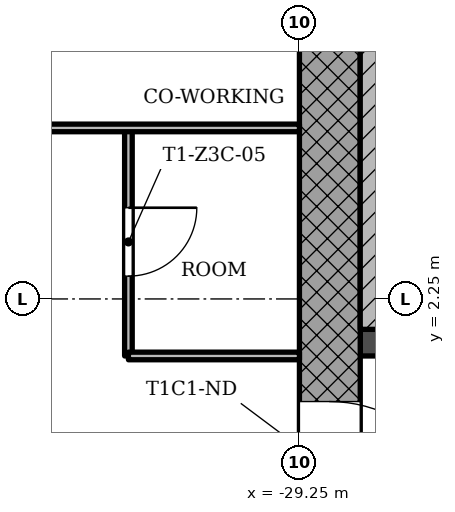
"""IFC4 building model, lengths in metres.
Left out: names, types, materials, properties, quantities, classifications, styles, units other than length and angle.
Written with IfcOpenShell. Run it as: python <this file> out.ifc"""

import sys

from ifc_helpers import new_model, si_unit, direction, frame, frame_2d, origin, place, context, subcontext, project, spatial, rectangle, extrude, element, fill, save


model = new_model("IFC4")
c1 = context("Model", 3, precision=1e-05, world=origin(), true_north=direction((0.0, 1.0)))
c2 = subcontext(c1, "Body", "Model", "MODEL_VIEW")
j1 = project(units=[si_unit("LENGTHUNIT", "METRE"), si_unit("PLANEANGLEUNIT", "RADIAN")], contexts=[c1])
p1 = place(None, origin())
s1 = spatial("IfcSite", under=j1, at=p1, CompositionType="ELEMENT")
p2 = place(p1, origin())
s2 = spatial("IfcBuilding", under=s1, at=p2, CompositionType="ELEMENT")
p3 = place(p2, frame((0.0, 0.0, 160.9)))
s3 = spatial("IfcBuildingStorey", under=s2, at=p3, CompositionType="ELEMENT", Elevation=160.9)
p4 = place(p3, frame((-28.85, 5.95, 0.0), z_axis=(0.0, 0.0, 1.0), x_axis=(0.0, -1.0, 0.0)))
e1 = element("IfcWall", 1, at=p4, inside=s3, PredefinedType="SHEAR", context=c2, shape_type="SweptSolid", body=[
    extrude(rectangle(XDim=12.7, YDim=0.8, at=frame_2d((6.35, 0.0))), origin(), (0.0, 0.0, 1.0), 3.4),
])
p5 = place(p4, frame((5.05, 0.0, 0.0)))
e2 = element("IfcOpeningElement", 2, at=p5, cuts=e1, PredefinedType="OPENING", context=c2, shape_type="SweptSolid", body=[
    extrude(rectangle(XDim=1.8, YDim=2.1, at=frame_2d((0.9, 1.05))), frame((0.0, 0.41, 0.0), z_axis=(0.0, -1.0, 0.0), x_axis=(1.0, 0.0, 0.0)), (0.0, 0.0, 1.0), 0.82),
])
p6 = place(p3, frame((-28.45, 1.675, 0.0), z_axis=(0.0, 0.0, 1.0), x_axis=(1.0, 0.0, 0.0)))
e3 = element("IfcWall", 3, at=p6, inside=s3, PredefinedType="SHEAR", context=c2, shape_type="SweptSolid", body=[
    extrude(rectangle(XDim=7.4, YDim=0.35, at=frame_2d((3.7, 0.0))), origin(), (0.0, 0.0, 1.0), 3.4),
])
p7 = place(p6, frame((0.85, 0.0, 0.0)))
e4 = element("IfcOpeningElement", 4, at=p7, cuts=e3, PredefinedType="OPENING", context=c2, shape_type="SweptSolid", body=[
    extrude(rectangle(XDim=0.9, YDim=2.1, at=frame_2d((0.45, 1.05))), frame((0.0, 0.185, 0.0), z_axis=(0.0, -1.0, 0.0), x_axis=(1.0, 0.0, 0.0)), (0.0, 0.0, 1.0), 0.37),
])
p8 = place(p3, frame((-31.5, 1.5, 0.0), z_axis=(0.0, 0.0, 1.0), x_axis=(0.0, 1.0, 0.0)))
e5 = element("IfcWall", 5, at=p8, inside=s3, PredefinedType="PARTITIONING", context=c2, shape_type="SweptSolid", body=[
    extrude(rectangle(XDim=3.0, YDim=0.1, at=frame_2d((1.5, 0.0))), origin(), (0.0, 0.0, 1.0), 3.0),
])
p9 = place(p8, frame((1.05, 0.0, 0.0)))
e6 = element("IfcOpeningElement", 6, at=p9, cuts=e5, PredefinedType="OPENING", context=c2, shape_type="SweptSolid", body=[
    extrude(rectangle(XDim=0.9, YDim=2.1, at=frame_2d((0.45, 1.05))), frame((0.0, 0.06, 0.0), z_axis=(0.0, -1.0, 0.0), x_axis=(1.0, 0.0, 0.0)), (0.0, 0.0, 1.0), 0.12),
])
p10 = place(p3, frame((-31.5, 1.5, 0.0), z_axis=(0.0, 0.0, 1.0), x_axis=(1.0, 0.0, 0.0)))
e7 = element("IfcWall", 7, at=p10, inside=s3, PredefinedType="PARTITIONING", context=c2, shape_type="SweptSolid", body=[
    extrude(rectangle(XDim=2.25, YDim=0.1, at=frame_2d((1.125, 0.0))), origin(), (0.0, 0.0, 1.0), 3.0),
])
p11 = place(p3, frame((-35.1, 4.5, 0.0), z_axis=(0.0, 0.0, 1.0), x_axis=(1.0, 0.0, 0.0)))
e8 = element("IfcWall", 8, at=p11, inside=s3, PredefinedType="PARTITIONING", context=c2, shape_type="SweptSolid", body=[
    extrude(rectangle(XDim=5.85, YDim=0.1, at=frame_2d((2.925, 0.0))), origin(), (0.0, 0.0, 1.0), 3.0),
])
p12 = place(p11, frame((1.35, 0.0, 0.0)))
e9 = element("IfcOpeningElement", 9, at=p12, cuts=e8, PredefinedType="OPENING", context=c2, shape_type="SweptSolid", body=[
    extrude(rectangle(XDim=0.9, YDim=2.1, at=frame_2d((0.45, 1.05))), frame((0.0, 0.06, 0.0), z_axis=(0.0, -1.0, 0.0), x_axis=(1.0, 0.0, 0.0)), (0.0, 0.0, 1.0), 0.12),
])
p13 = place(p3, frame((-28.25, 1.85, 0.0), z_axis=(0.0, 0.0, 1.0), x_axis=(0.0, 1.0, 0.0)))
e10 = element("IfcWall", 10, at=p13, inside=s3, PredefinedType="SHEAR", context=c2, shape_type="SweptSolid", body=[
    extrude(rectangle(XDim=4.1, YDim=0.4, at=frame_2d((2.05, 0.0))), origin(), (0.0, 0.0, 1.0), 3.4),
])
p14 = place(p9, origin())
e11 = element("IfcDoor", 11, at=p14, inside=s3, OperationType="SINGLE_SWING_RIGHT", PredefinedType="DOOR", context=c2, shape_type="SweptSolid", body=[
    extrude(rectangle(XDim=0.9, YDim=2.1, at=frame_2d((0.45, 1.05))), frame((0.0, 0.025, 0.0), z_axis=(0.0, -1.0, 0.0), x_axis=(1.0, 0.0, 0.0)), (0.0, 0.0, 1.0), 0.05),
])
fill(e6, e11)
p15 = place(p5, origin())
e12 = element("IfcDoor", 12, at=p15, inside=s3, OperationType="SINGLE_SWING_LEFT", PredefinedType="DOOR", context=c2, shape_type="SweptSolid", body=[
    extrude(rectangle(XDim=1.8, YDim=2.1, at=frame_2d((0.9, 1.05))), frame((0.0, 0.025, 0.0), z_axis=(0.0, -1.0, 0.0), x_axis=(1.0, 0.0, 0.0)), (0.0, 0.0, 1.0), 0.05),
])
fill(e2, e12)
save(model, sys.argv[1])
